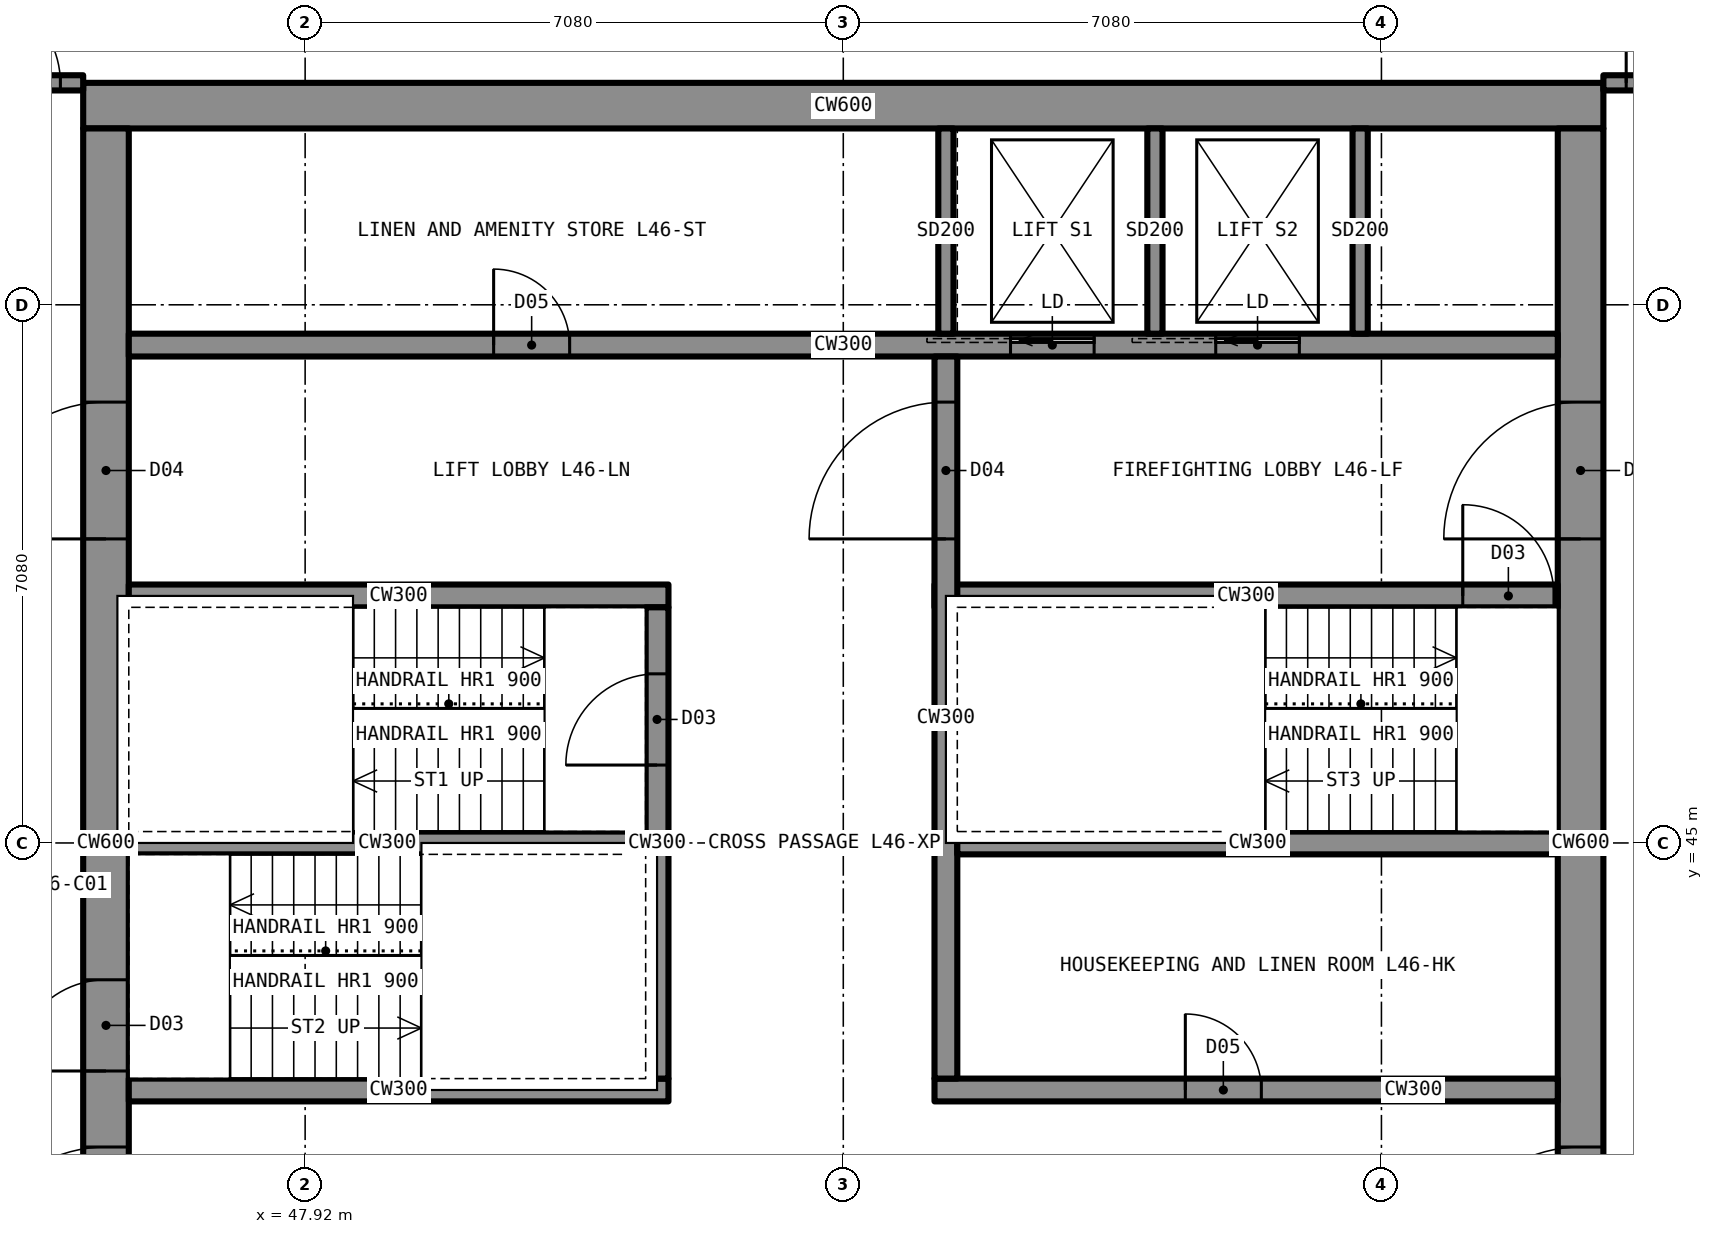
"""IFC4 building model, lengths in metres.
Left out: names, types, materials, properties, quantities, classifications, styles, units other than length and angle.
Written with IfcOpenShell. Run it as: python <this file> out.ifc"""

import sys

from ifc_helpers import new_model, si_unit, direction, frame, frame_2d, origin, place, context, subcontext, project, spatial, rectangle, extrude, element, fill, save


model = new_model("IFC4")
c1 = context("Model", 3, precision=1e-05, world=origin(), true_north=direction((0.0, 1.0)))
c2 = subcontext(c1, "Body", "Model", "MODEL_VIEW")
j1 = project(units=[si_unit("LENGTHUNIT", "METRE"), si_unit("PLANEANGLEUNIT", "RADIAN")], contexts=[c1])
p1 = place(None, origin())
s1 = spatial("IfcSite", under=j1, at=p1, CompositionType="ELEMENT")
p2 = place(p1, origin())
s2 = spatial("IfcBuilding", under=s1, at=p2, CompositionType="ELEMENT")
p3 = place(p2, frame((0.0, 0.0, 172.3)))
s3 = spatial("IfcBuildingStorey", under=s2, at=p3, CompositionType="ELEMENT", Elevation=172.3)
p4 = place(p3, frame((45.0, 54.7, 0.0), z_axis=(0.0, 0.0, 1.0), x_axis=(1.0, 0.0, 0.0)))
e1 = element("IfcWall", 1, at=p4, inside=s3, PredefinedType="SHEAR", context=c2, shape_type="SweptSolid", body=[
    extrude(rectangle(XDim=20.0, YDim=0.6, at=frame_2d((10.0, 0.0))), origin(), (0.0, 0.0, 1.0), 3.5),
])
p5 = place(p3, frame((64.7, 35.6, 0.0), z_axis=(0.0, 0.0, 1.0), x_axis=(0.0, 1.0, 0.0)))
e2 = element("IfcWall", 2, at=p5, inside=s3, PredefinedType="SHEAR", context=c2, shape_type="SweptSolid", body=[
    extrude(rectangle(XDim=18.8, YDim=0.6, at=frame_2d((9.4, 0.0))), origin(), (0.0, 0.0, 1.0), 3.5),
])
p6 = place(p5, frame((13.4, 0.0, 0.0)))
e3 = element("IfcOpeningElement", 3, at=p6, cuts=e2, PredefinedType="OPENING", context=c2, shape_type="SweptSolid", body=[
    extrude(rectangle(XDim=1.8, YDim=2.2, at=frame_2d((0.9, 1.1))), frame((0.0, 0.31, 0.0), z_axis=(0.0, -1.0, 0.0), x_axis=(1.0, 0.0, 0.0)), (0.0, 0.0, 1.0), 0.62),
])
p7 = place(p5, frame((3.6, 0.0, 0.0)))
e4 = element("IfcOpeningElement", 4, at=p7, cuts=e2, PredefinedType="OPENING", context=c2, shape_type="SweptSolid", body=[
    extrude(rectangle(XDim=1.8, YDim=2.2, at=frame_2d((0.9, 1.1))), frame((0.0, 0.31, 0.0), z_axis=(0.0, -1.0, 0.0), x_axis=(1.0, 0.0, 0.0)), (0.0, 0.0, 1.0), 0.62),
])
p8 = place(p3, frame((45.3, 35.6, 0.0), z_axis=(0.0, 0.0, 1.0), x_axis=(0.0, 1.0, 0.0)))
e5 = element("IfcWall", 5, at=p8, inside=s3, PredefinedType="SHEAR", context=c2, shape_type="SweptSolid", body=[
    extrude(rectangle(XDim=18.8, YDim=0.6, at=frame_2d((9.4, 0.0))), origin(), (0.0, 0.0, 1.0), 3.5),
])
p9 = place(p8, frame((13.4, 0.0, 0.0)))
e6 = element("IfcOpeningElement", 6, at=p9, cuts=e5, PredefinedType="OPENING", context=c2, shape_type="SweptSolid", body=[
    extrude(rectangle(XDim=1.8, YDim=2.2, at=frame_2d((0.9, 1.1))), frame((0.0, 0.31, 0.0), z_axis=(0.0, -1.0, 0.0), x_axis=(1.0, 0.0, 0.0)), (0.0, 0.0, 1.0), 0.62),
])
p10 = place(p8, frame((3.6, 0.0, 0.0)))
e7 = element("IfcOpeningElement", 7, at=p10, cuts=e5, PredefinedType="OPENING", context=c2, shape_type="SweptSolid", body=[
    extrude(rectangle(XDim=1.8, YDim=2.2, at=frame_2d((0.9, 1.1))), frame((0.0, 0.31, 0.0), z_axis=(0.0, -1.0, 0.0), x_axis=(1.0, 0.0, 0.0)), (0.0, 0.0, 1.0), 0.62),
])
p11 = place(p8, frame((6.4, 0.0, 0.0)))
e8 = element("IfcOpeningElement", 8, at=p11, cuts=e5, PredefinedType="OPENING", context=c2, shape_type="SweptSolid", body=[
    extrude(rectangle(XDim=1.2, YDim=2.2, at=frame_2d((0.6, 1.1))), frame((0.0, 0.31, 0.0), z_axis=(0.0, -1.0, 0.0), x_axis=(1.0, 0.0, 0.0)), (0.0, 0.0, 1.0), 0.62),
])
p12 = place(p3, frame((45.6, 51.55, 0.0), z_axis=(0.0, 0.0, 1.0), x_axis=(1.0, 0.0, 0.0)))
e9 = element("IfcWall", 9, at=p12, inside=s3, PredefinedType="SHEAR", context=c2, shape_type="SweptSolid", body=[
    extrude(rectangle(XDim=18.8, YDim=0.3, at=frame_2d((9.4, 0.0))), origin(), (0.0, 0.0, 1.0), 3.5),
])
p13 = place(p12, frame((4.8, 0.0, 0.0)))
e10 = element("IfcOpeningElement", 10, at=p13, cuts=e9, PredefinedType="OPENING", context=c2, shape_type="SweptSolid", body=[
    extrude(rectangle(XDim=1.0, YDim=2.1, at=frame_2d((0.5, 1.05))), frame((0.0, 0.16, 0.0), z_axis=(0.0, -1.0, 0.0), x_axis=(1.0, 0.0, 0.0)), (0.0, 0.0, 1.0), 0.32),
])
p14 = place(p12, frame((11.6, 0.0, 0.0)))
e11 = element("IfcOpeningElement", 11, at=p14, cuts=e9, PredefinedType="OPENING", context=c2, shape_type="SweptSolid", body=[
    extrude(rectangle(XDim=1.1, YDim=2.2, at=frame_2d((0.55, 1.1))), frame((0.0, 0.16, 0.0), z_axis=(0.0, -1.0, 0.0), x_axis=(1.0, 0.0, 0.0)), (0.0, 0.0, 1.0), 0.32),
])
p15 = place(p12, frame((14.3, 0.0, 0.0)))
e12 = element("IfcOpeningElement", 12, at=p15, cuts=e9, PredefinedType="OPENING", context=c2, shape_type="SweptSolid", body=[
    extrude(rectangle(XDim=1.1, YDim=2.2, at=frame_2d((0.55, 1.1))), frame((0.0, 0.16, 0.0), z_axis=(0.0, -1.0, 0.0), x_axis=(1.0, 0.0, 0.0)), (0.0, 0.0, 1.0), 0.32),
])
p16 = place(p3, frame((45.6, 48.25, 0.0), z_axis=(0.0, 0.0, 1.0), x_axis=(1.0, 0.0, 0.0)))
e13 = element("IfcWall", 13, at=p16, inside=s3, PredefinedType="SHEAR", context=c2, shape_type="SweptSolid", body=[
    extrude(rectangle(XDim=7.1, YDim=0.3, at=frame_2d((3.55, 0.0))), origin(), (0.0, 0.0, 1.0), 3.5),
])
p17 = place(p3, frame((56.2, 48.25, 0.0), z_axis=(0.0, 0.0, 1.0), x_axis=(1.0, 0.0, 0.0)))
e14 = element("IfcWall", 14, at=p17, inside=s3, PredefinedType="SHEAR", context=c2, shape_type="SweptSolid", body=[
    extrude(rectangle(XDim=8.2, YDim=0.3, at=frame_2d((4.1, 0.0))), origin(), (0.0, 0.0, 1.0), 3.5),
])
p18 = place(p17, frame((6.95, 0.0, 0.0)))
e15 = element("IfcOpeningElement", 15, at=p18, cuts=e14, PredefinedType="OPENING", context=c2, shape_type="SweptSolid", body=[
    extrude(rectangle(XDim=1.2, YDim=2.2, at=frame_2d((0.6, 1.1))), frame((0.0, 0.16, 0.0), z_axis=(0.0, -1.0, 0.0), x_axis=(1.0, 0.0, 0.0)), (0.0, 0.0, 1.0), 0.32),
])
p19 = place(p3, frame((45.6, 41.75, 0.0), z_axis=(0.0, 0.0, 1.0), x_axis=(1.0, 0.0, 0.0)))
e16 = element("IfcWall", 16, at=p19, inside=s3, PredefinedType="SHEAR", context=c2, shape_type="SweptSolid", body=[
    extrude(rectangle(XDim=7.1, YDim=0.3, at=frame_2d((3.55, 0.0))), origin(), (0.0, 0.0, 1.0), 3.5),
])
p20 = place(p3, frame((56.2, 41.75, 0.0), z_axis=(0.0, 0.0, 1.0), x_axis=(1.0, 0.0, 0.0)))
e17 = element("IfcWall", 17, at=p20, inside=s3, PredefinedType="SHEAR", context=c2, shape_type="SweptSolid", body=[
    extrude(rectangle(XDim=8.2, YDim=0.3, at=frame_2d((4.1, 0.0))), origin(), (0.0, 0.0, 1.0), 3.5),
])
p21 = place(p20, frame((3.3, 0.0, 0.0)))
e18 = element("IfcOpeningElement", 18, at=p21, cuts=e17, PredefinedType="OPENING", context=c2, shape_type="SweptSolid", body=[
    extrude(rectangle(XDim=1.0, YDim=2.1, at=frame_2d((0.5, 1.05))), frame((0.0, 0.16, 0.0), z_axis=(0.0, -1.0, 0.0), x_axis=(1.0, 0.0, 0.0)), (0.0, 0.0, 1.0), 0.32),
])
p22 = place(p3, frame((52.55, 41.9, 0.0), z_axis=(0.0, 0.0, 1.0), x_axis=(0.0, 1.0, 0.0)))
e19 = element("IfcWall", 19, at=p22, inside=s3, PredefinedType="SHEAR", context=c2, shape_type="SweptSolid", body=[
    extrude(rectangle(XDim=6.2, YDim=0.3, at=frame_2d((3.1, 0.0))), origin(), (0.0, 0.0, 1.0), 3.5),
])
p23 = place(p22, frame((4.125, 0.0, 0.0)))
e20 = element("IfcOpeningElement", 20, at=p23, cuts=e19, PredefinedType="OPENING", context=c2, shape_type="SweptSolid", body=[
    extrude(rectangle(XDim=1.2, YDim=2.2, at=frame_2d((0.6, 1.1))), frame((0.0, 0.16, 0.0), z_axis=(0.0, -1.0, 0.0), x_axis=(1.0, 0.0, 0.0)), (0.0, 0.0, 1.0), 0.32),
])
p24 = place(p3, frame((56.35, 41.9, 0.0), z_axis=(0.0, 0.0, 1.0), x_axis=(0.0, 1.0, 0.0)))
e21 = element("IfcWall", 21, at=p24, inside=s3, PredefinedType="SHEAR", context=c2, shape_type="SweptSolid", body=[
    extrude(rectangle(XDim=9.5, YDim=0.3, at=frame_2d((4.75, 0.0))), origin(), (0.0, 0.0, 1.0), 3.5),
])
p25 = place(p24, frame((7.1, 0.0, 0.0)))
e22 = element("IfcOpeningElement", 22, at=p25, cuts=e21, PredefinedType="OPENING", context=c2, shape_type="SweptSolid", body=[
    extrude(rectangle(XDim=1.8, YDim=2.2, at=frame_2d((0.9, 1.1))), frame((0.0, 0.16, 0.0), z_axis=(0.0, -1.0, 0.0), x_axis=(1.0, 0.0, 0.0)), (0.0, 0.0, 1.0), 0.32),
])
p26 = place(p3, frame((45.6, 45.0, 0.0), z_axis=(0.0, 0.0, 1.0), x_axis=(1.0, 0.0, 0.0)))
e23 = element("IfcWall", 23, at=p26, inside=s3, PredefinedType="SHEAR", context=c2, shape_type="SweptSolid", body=[
    extrude(rectangle(XDim=6.8, YDim=0.3, at=frame_2d((3.4, 0.0))), origin(), (0.0, 0.0, 1.0), 3.5),
])
p27 = place(p3, frame((56.5, 45.0, 0.0), z_axis=(0.0, 0.0, 1.0), x_axis=(1.0, 0.0, 0.0)))
e24 = element("IfcWall", 24, at=p27, inside=s3, PredefinedType="SHEAR", context=c2, shape_type="SweptSolid", body=[
    extrude(rectangle(XDim=7.9, YDim=0.3, at=frame_2d((3.95, 0.0))), origin(), (0.0, 0.0, 1.0), 3.5),
])
p28 = place(p3, frame((43.2, 55.0, 0.0), z_axis=(0.0, 0.0, 1.0), x_axis=(1.0, 0.0, 0.0)))
e25 = element("IfcWall", 25, at=p28, inside=s3, PredefinedType="PARTITIONING", context=c2, shape_type="SweptSolid", body=[
    extrude(rectangle(XDim=1.8, YDim=0.2, at=frame_2d((0.9, 0.0))), origin(), (0.0, 0.0, 1.0), 3.33),
])
p29 = place(p28, frame((0.3, 0.0, 0.0)))
e26 = element("IfcOpeningElement", 26, at=p29, cuts=e25, PredefinedType="OPENING", context=c2, shape_type="SweptSolid", body=[
    extrude(rectangle(XDim=1.2, YDim=2.2, at=frame_2d((0.6, 1.1))), frame((0.0, 0.11, 0.0), z_axis=(0.0, -1.0, 0.0), x_axis=(1.0, 0.0, 0.0)), (0.0, 0.0, 1.0), 0.22),
])
p30 = place(p3, frame((65.0, 55.0, 0.0), z_axis=(0.0, 0.0, 1.0), x_axis=(1.0, 0.0, 0.0)))
e27 = element("IfcWall", 27, at=p30, inside=s3, PredefinedType="PARTITIONING", context=c2, shape_type="SweptSolid", body=[
    extrude(rectangle(XDim=1.8, YDim=0.2, at=frame_2d((0.9, 0.0))), origin(), (0.0, 0.0, 1.0), 3.33),
])
p31 = place(p30, frame((0.3, 0.0, 0.0)))
e28 = element("IfcOpeningElement", 28, at=p31, cuts=e27, PredefinedType="OPENING", context=c2, shape_type="SweptSolid", body=[
    extrude(rectangle(XDim=1.2, YDim=2.2, at=frame_2d((0.6, 1.1))), frame((0.0, 0.11, 0.0), z_axis=(0.0, -1.0, 0.0), x_axis=(1.0, 0.0, 0.0)), (0.0, 0.0, 1.0), 0.22),
])
for number, where, z_axis, x_axis in (
    (29, (59.1, 51.7, 0.0), (0.0, 0.0, 1.0), (0.0, 1.0, 0.0)),
    (30, (61.8, 51.7, 0.0), (0.0, 0.0, 1.0), (0.0, 1.0, 0.0)),
    (31, (56.35, 51.7, 0.0), (0.0, 0.0, 1.0), (0.0, 1.0, 0.0)),
):
    element("IfcWall", number, at=place(p3, frame(where, z_axis=z_axis, x_axis=x_axis)), inside=s3, PredefinedType="PARTITIONING", context=c2, shape_type="SweptSolid", body=[
        extrude(rectangle(XDim=2.7, YDim=0.2, at=frame_2d((1.35, 0.0))), origin(), (0.0, 0.0, 1.0), 3.33),
    ])
p32 = place(p29, origin())
e32 = element("IfcDoor", 32, at=p32, inside=s3, OperationType="SINGLE_SWING_LEFT", PredefinedType="DOOR", context=c2, shape_type="SweptSolid", body=[
    extrude(rectangle(XDim=1.2, YDim=2.2, at=frame_2d((0.6, 1.1))), frame((0.0, 0.025, 0.0), z_axis=(0.0, -1.0, 0.0), x_axis=(1.0, 0.0, 0.0)), (0.0, 0.0, 1.0), 0.05),
])
fill(e26, e32)
p33 = place(p31, origin())
e33 = element("IfcDoor", 33, at=p33, inside=s3, OperationType="SINGLE_SWING_LEFT", PredefinedType="DOOR", context=c2, shape_type="SweptSolid", body=[
    extrude(rectangle(XDim=1.2, YDim=2.2, at=frame_2d((0.6, 1.1))), frame((0.0, 0.025, 0.0), z_axis=(0.0, -1.0, 0.0), x_axis=(1.0, 0.0, 0.0)), (0.0, 0.0, 1.0), 0.05),
])
fill(e28, e33)
p34 = place(p9, origin())
e34 = element("IfcDoor", 34, at=p34, inside=s3, OperationType="DOUBLE_DOOR_SINGLE_SWING", PredefinedType="DOOR", context=c2, shape_type="SweptSolid", body=[
    extrude(rectangle(XDim=1.8, YDim=2.2, at=frame_2d((0.9, 1.1))), frame((0.0, 0.025, 0.0), z_axis=(0.0, -1.0, 0.0), x_axis=(1.0, 0.0, 0.0)), (0.0, 0.0, 1.0), 0.05),
])
fill(e6, e34)
p35 = place(p10, origin())
e35 = element("IfcDoor", 35, at=p35, inside=s3, OperationType="DOUBLE_DOOR_SINGLE_SWING", PredefinedType="DOOR", context=c2, shape_type="SweptSolid", body=[
    extrude(rectangle(XDim=1.8, YDim=2.2, at=frame_2d((0.9, 1.1))), frame((0.0, 0.025, 0.0), z_axis=(0.0, -1.0, 0.0), x_axis=(1.0, 0.0, 0.0)), (0.0, 0.0, 1.0), 0.05),
])
fill(e7, e35)
p36 = place(p6, origin())
e36 = element("IfcDoor", 36, at=p36, inside=s3, OperationType="DOUBLE_DOOR_SINGLE_SWING", PredefinedType="DOOR", context=c2, shape_type="SweptSolid", body=[
    extrude(rectangle(XDim=1.8, YDim=2.2, at=frame_2d((0.9, 1.1))), frame((0.0, 0.025, 0.0), z_axis=(0.0, -1.0, 0.0), x_axis=(1.0, 0.0, 0.0)), (0.0, 0.0, 1.0), 0.05),
])
fill(e3, e36)
p37 = place(p7, origin())
e37 = element("IfcDoor", 37, at=p37, inside=s3, OperationType="DOUBLE_DOOR_SINGLE_SWING", PredefinedType="DOOR", context=c2, shape_type="SweptSolid", body=[
    extrude(rectangle(XDim=1.8, YDim=2.2, at=frame_2d((0.9, 1.1))), frame((0.0, 0.025, 0.0), z_axis=(0.0, -1.0, 0.0), x_axis=(1.0, 0.0, 0.0)), (0.0, 0.0, 1.0), 0.05),
])
fill(e4, e37)
p38 = place(p25, origin())
e38 = element("IfcDoor", 38, at=p38, inside=s3, OperationType="DOUBLE_DOOR_SINGLE_SWING", PredefinedType="DOOR", context=c2, shape_type="SweptSolid", body=[
    extrude(rectangle(XDim=1.8, YDim=2.2, at=frame_2d((0.9, 1.1))), frame((0.0, 0.025, 0.0), z_axis=(0.0, -1.0, 0.0), x_axis=(1.0, 0.0, 0.0)), (0.0, 0.0, 1.0), 0.05),
])
fill(e22, e38)
p39 = place(p23, origin())
e39 = element("IfcDoor", 39, at=p39, inside=s3, OperationType="SINGLE_SWING_LEFT", PredefinedType="DOOR", context=c2, shape_type="SweptSolid", body=[
    extrude(rectangle(XDim=1.2, YDim=2.2, at=frame_2d((0.6, 1.1))), frame((0.0, 0.025, 0.0), z_axis=(0.0, -1.0, 0.0), x_axis=(1.0, 0.0, 0.0)), (0.0, 0.0, 1.0), 0.05),
])
fill(e20, e39)
p40 = place(p11, origin())
e40 = element("IfcDoor", 40, at=p40, inside=s3, OperationType="SINGLE_SWING_LEFT", PredefinedType="DOOR", context=c2, shape_type="SweptSolid", body=[
    extrude(rectangle(XDim=1.2, YDim=2.2, at=frame_2d((0.6, 1.1))), frame((0.0, 0.025, 0.0), z_axis=(0.0, -1.0, 0.0), x_axis=(1.0, 0.0, 0.0)), (0.0, 0.0, 1.0), 0.05),
])
fill(e8, e40)
p41 = place(p18, origin())
e41 = element("IfcDoor", 41, at=p41, inside=s3, OperationType="SINGLE_SWING_LEFT", PredefinedType="DOOR", context=c2, shape_type="SweptSolid", body=[
    extrude(rectangle(XDim=1.2, YDim=2.2, at=frame_2d((0.6, 1.1))), frame((0.0, 0.025, 0.0), z_axis=(0.0, -1.0, 0.0), x_axis=(1.0, 0.0, 0.0)), (0.0, 0.0, 1.0), 0.05),
])
fill(e15, e41)
p42 = place(p21, origin())
e42 = element("IfcDoor", 42, at=p42, inside=s3, OperationType="SINGLE_SWING_LEFT", PredefinedType="DOOR", context=c2, shape_type="SweptSolid", body=[
    extrude(rectangle(XDim=1.0, YDim=2.1, at=frame_2d((0.5, 1.05))), frame((0.0, 0.025, 0.0), z_axis=(0.0, -1.0, 0.0), x_axis=(1.0, 0.0, 0.0)), (0.0, 0.0, 1.0), 0.05),
])
fill(e18, e42)
p43 = place(p13, origin())
e43 = element("IfcDoor", 43, at=p43, inside=s3, OperationType="SINGLE_SWING_LEFT", PredefinedType="DOOR", context=c2, shape_type="SweptSolid", body=[
    extrude(rectangle(XDim=1.0, YDim=2.1, at=frame_2d((0.5, 1.05))), frame((0.0, 0.025, 0.0), z_axis=(0.0, -1.0, 0.0), x_axis=(1.0, 0.0, 0.0)), (0.0, 0.0, 1.0), 0.05),
])
fill(e10, e43)
p44 = place(p14, origin())
e44 = element("IfcDoor", 44, at=p44, inside=s3, OperationType="SLIDING_TO_LEFT", PredefinedType="DOOR", context=c2, shape_type="SweptSolid", body=[
    extrude(rectangle(XDim=1.1, YDim=2.2, at=frame_2d((0.55, 1.1))), frame((0.0, 0.025, 0.0), z_axis=(0.0, -1.0, 0.0), x_axis=(1.0, 0.0, 0.0)), (0.0, 0.0, 1.0), 0.05),
])
fill(e11, e44)
p45 = place(p15, origin())
e45 = element("IfcDoor", 45, at=p45, inside=s3, OperationType="SLIDING_TO_LEFT", PredefinedType="DOOR", context=c2, shape_type="SweptSolid", body=[
    extrude(rectangle(XDim=1.1, YDim=2.2, at=frame_2d((0.55, 1.1))), frame((0.0, 0.025, 0.0), z_axis=(0.0, -1.0, 0.0), x_axis=(1.0, 0.0, 0.0)), (0.0, 0.0, 1.0), 0.05),
])
fill(e12, e45)
save(model, sys.argv[1])
